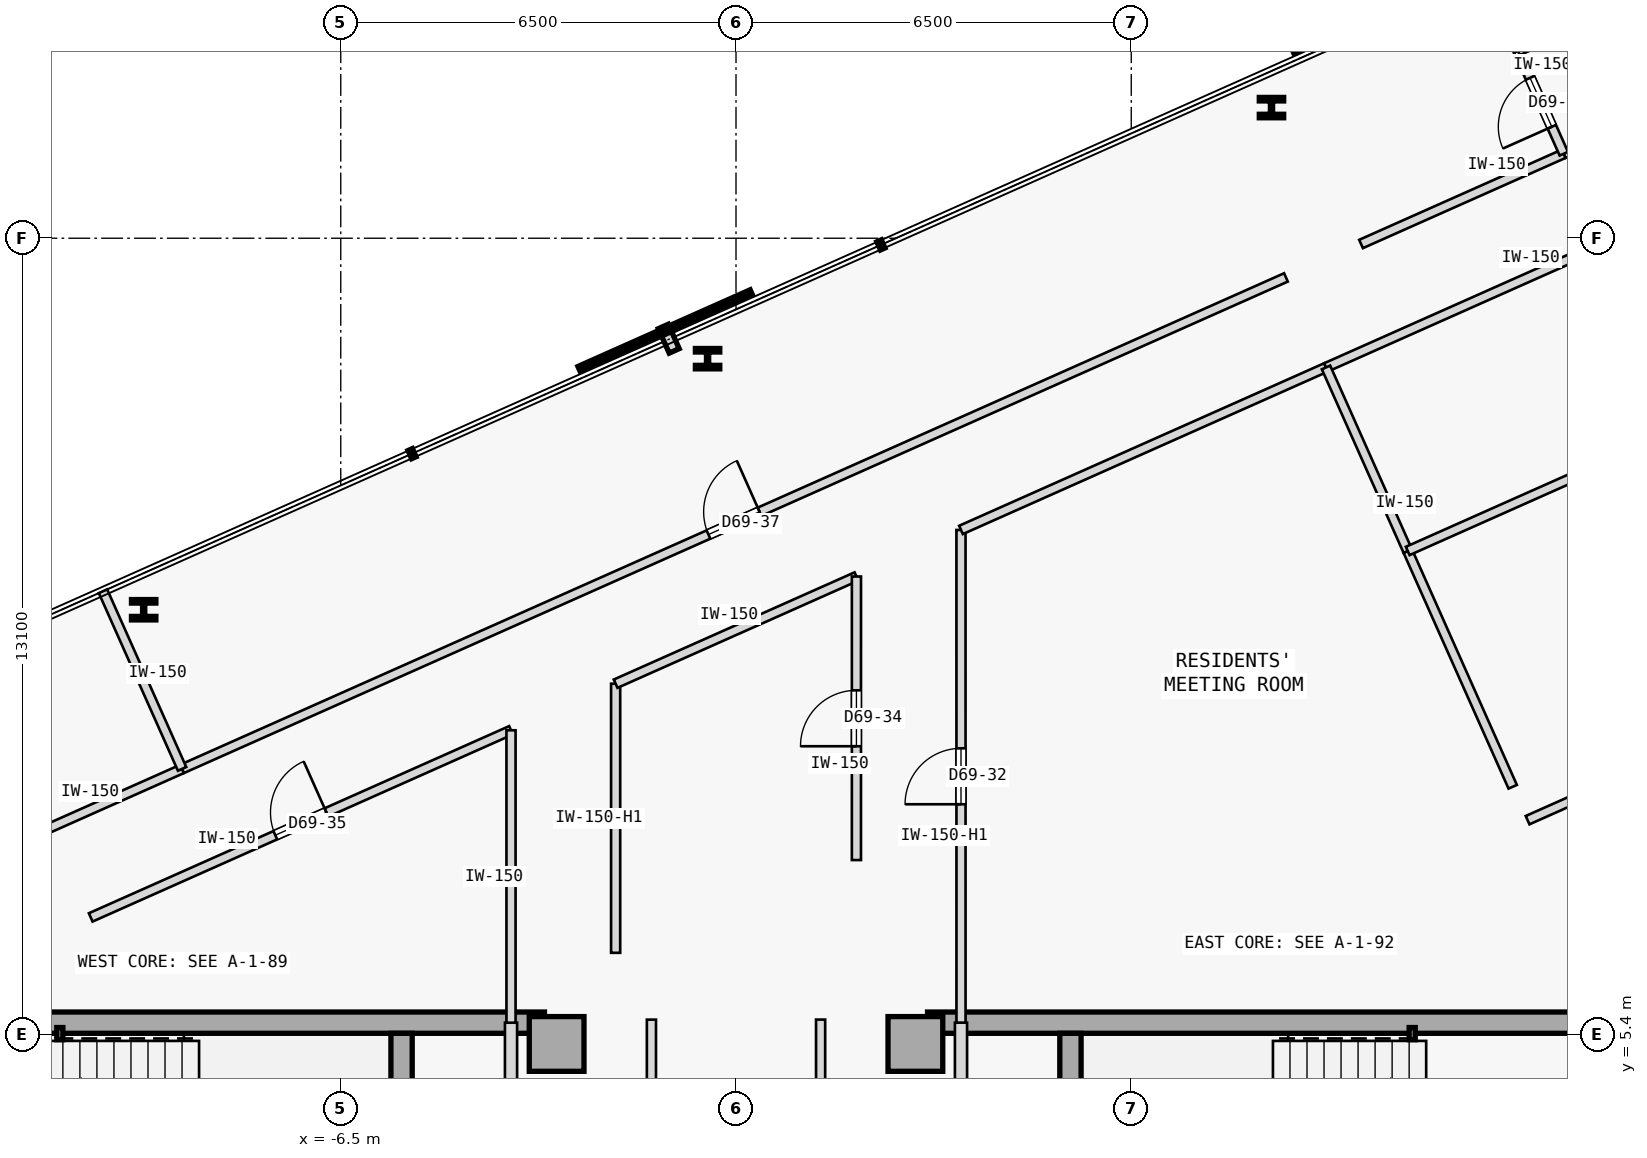
"""IFC4 building model, lengths in metres.
Left out: names, types, materials, properties, quantities, classifications, styles, units other than length and angle.
Written with IfcOpenShell. Run it as: python <this file> out.ifc"""

import sys

from ifc_helpers import new_model, si_unit, direction, frame, frame_2d, origin, origin_2d, place, context, subcontext, project, spatial, rectangle, hollow_rectangle, i_section, extrude, element, fill, save


model = new_model("IFC4")
c1 = context("Model", 3, precision=1e-05, world=origin(), true_north=direction((0.0, 1.0)))
c2 = subcontext(c1, "Body", "Model", "MODEL_VIEW")
j1 = project(units=[si_unit("LENGTHUNIT", "METRE"), si_unit("PLANEANGLEUNIT", "RADIAN")], contexts=[c1])
p1 = place(None, origin())
s1 = spatial("IfcSite", under=j1, at=p1, CompositionType="ELEMENT")
p2 = place(p1, origin())
s2 = spatial("IfcBuilding", under=s1, at=p2, CompositionType="ELEMENT")
p3 = place(p2, frame((0.0, 0.0, 258.85)))
s3 = spatial("IfcBuildingStorey", under=s2, at=p3, CompositionType="ELEMENT", Elevation=258.85)
for number, where, z_axis, x_axis in (
    (1, (-2.95, 5.25, 0.0), (0.0, 0.0, 1.0), (1.0, 0.0, 0.0)),
    (2, (2.95, 5.25, 0.0), (0.0, 0.0, 1.0), (1.0, 0.0, 0.0)),
):
    element("IfcColumn", number, at=place(p3, frame(where, z_axis=z_axis, x_axis=x_axis)), inside=s3, PredefinedType="COLUMN", context=c2, shape_type="SweptSolid", body=[
        extrude(rectangle(XDim=0.9, YDim=0.9, at=origin_2d()), origin(), (0.0, 0.0, 1.0), 3.35),
    ])
p4 = place(p3, frame((-14.56, 5.6, 0.0), z_axis=(0.0, 0.0, 1.0), x_axis=(1.0, 0.0, 0.0)))
e3 = element("IfcWall", 3, at=p4, inside=s3, PredefinedType="SHEAR", context=c2, shape_type="SweptSolid", body=[
    extrude(rectangle(XDim=11.41, YDim=0.35, at=frame_2d((5.705, 0.0))), origin(), (0.0, 0.0, 1.0), 3.125),
])
p5 = place(p3, frame((-5.5, 2.15, 0.0), z_axis=(0.0, 0.0, 1.0), x_axis=(0.0, 1.0, 0.0)))
e4 = element("IfcWall", 4, at=p5, inside=s3, PredefinedType="SHEAR", context=c2, shape_type="SweptSolid", body=[
    extrude(rectangle(XDim=3.275, YDim=0.35, at=frame_2d((1.638, 0.0))), origin(), (0.0, 0.0, 1.0), 3.125),
])
p6 = place(p3, frame((3.15, 5.6, 0.0), z_axis=(0.0, 0.0, 1.0), x_axis=(1.0, 0.0, 0.0)))
e5 = element("IfcWall", 5, at=p6, inside=s3, PredefinedType="SHEAR", context=c2, shape_type="SweptSolid", body=[
    extrude(rectangle(XDim=11.41, YDim=0.35, at=frame_2d((5.705, 0.0))), origin(), (0.0, 0.0, 1.0), 3.125),
])
p7 = place(p3, frame((5.5, 2.15, 0.0), z_axis=(0.0, 0.0, 1.0), x_axis=(0.0, 1.0, 0.0)))
e6 = element("IfcWall", 6, at=p7, inside=s3, PredefinedType="SHEAR", context=c2, shape_type="SweptSolid", body=[
    extrude(rectangle(XDim=3.275, YDim=0.35, at=frame_2d((1.638, 0.0))), origin(), (0.0, 0.0, 1.0), 3.125),
])
for number, where, z_axis, x_axis in (
    (7, (-11.12, 5.42, 0.0), (0.0, 0.0, 1.0), (1.0, 0.0, 0.0)),
    (8, (11.12, 5.42, 0.0), (0.0, 0.0, 1.0), (1.0, 0.0, 0.0)),
):
    element("IfcColumn", number, at=place(p3, frame(where, z_axis=z_axis, x_axis=x_axis)), inside=s3, PredefinedType="COLUMN", context=c2, shape_type="SweptSolid", body=[
        extrude(hollow_rectangle(XDim=0.1, YDim=0.2, WallThickness=0.008, at=origin_2d()), origin(), (0.0, 0.0, 1.0), 3.35),
    ])
for number, where, z_axis, x_axis in (
    (9, (8.806, 20.648, 0.0), (0.0, 0.0, 1.0), (1.0, 0.0, 0.0)),
    (10, (-0.468, 16.519, 0.0), (0.0, 0.0, 1.0), (1.0, 0.0, 0.0)),
    (11, (-9.741, 12.39, 0.0), (0.0, 0.0, 1.0), (1.0, 0.0, 0.0)),
):
    element("IfcColumn", number, at=place(p3, frame(where, z_axis=z_axis, x_axis=x_axis)), inside=s3, PredefinedType="COLUMN", context=c2, shape_type="SweptSolid", body=[
        extrude(i_section(OverallWidth=0.401, OverallDepth=0.335, WebThickness=0.036, FlangeThickness=0.058, FilletRadius=0.015, at=origin_2d()), origin(), (0.0, 0.0, 1.0), 3.35),
    ])
p8 = place(p3, frame((-3.7, -1.15, 0.0), z_axis=(0.0, 0.0, 1.0), x_axis=(0.0, 1.0, 0.0)))
e12 = element("IfcWall", 12, at=p8, inside=s3, PredefinedType="STANDARD", context=c2, shape_type="SweptSolid", body=[
    extrude(rectangle(XDim=6.75, YDim=0.2, at=frame_2d((3.375, 0.0))), origin(), (0.0, 0.0, 1.0), 3.125),
])
p9 = place(p8, frame((3.6, 0.0, 0.0)))
e13 = element("IfcOpeningElement", 13, at=p9, cuts=e12, PredefinedType="OPENING", context=c2, shape_type="SweptSolid", body=[
    extrude(rectangle(XDim=0.92, YDim=2.15, at=frame_2d((0.46, 1.075))), frame((0.0, 0.11, 0.0), z_axis=(0.0, -1.0, 0.0), x_axis=(1.0, 0.0, 0.0)), (0.0, 0.0, 1.0), 0.22),
])
p10 = place(p3, frame((3.7, -1.15, 0.0), z_axis=(0.0, 0.0, 1.0), x_axis=(0.0, 1.0, 0.0)))
e14 = element("IfcWall", 14, at=p10, inside=s3, PredefinedType="STANDARD", context=c2, shape_type="SweptSolid", body=[
    extrude(rectangle(XDim=6.75, YDim=0.2, at=frame_2d((3.375, 0.0))), origin(), (0.0, 0.0, 1.0), 3.125),
])
p11 = place(p10, frame((1.1, 0.0, 0.0)))
e15 = element("IfcOpeningElement", 15, at=p11, cuts=e14, PredefinedType="OPENING", context=c2, shape_type="SweptSolid", body=[
    extrude(rectangle(XDim=0.9, YDim=2.15, at=frame_2d((0.45, 1.075))), frame((0.0, 0.11, 0.0), z_axis=(0.0, -1.0, 0.0), x_axis=(1.0, 0.0, 0.0)), (0.0, 0.0, 1.0), 0.22),
])
p12 = place(p10, frame((4.0, 0.0, 0.0)))
e16 = element("IfcOpeningElement", 16, at=p12, cuts=e14, PredefinedType="OPENING", context=c2, shape_type="SweptSolid", body=[
    extrude(rectangle(XDim=0.92, YDim=2.15, at=frame_2d((0.46, 1.075))), frame((0.0, 0.11, 0.0), z_axis=(0.0, -1.0, 0.0), x_axis=(1.0, 0.0, 0.0)), (0.0, 0.0, 1.0), 0.22),
])
p13 = place(p3, frame((-1.391, -5.65, 0.0), z_axis=(0.0, 0.0, 1.0), x_axis=(-2.1605738e-05, 0.999999999767, 0.0)))
e17 = element("IfcWall", 17, at=p13, inside=s3, PredefinedType="PARTITIONING", context=c2, shape_type="SweptSolid", body=[
    extrude(rectangle(XDim=11.3, YDim=0.15, at=frame_2d((5.65, 0.0))), origin(), (0.0, 0.0, 1.0), 3.125),
])
p14 = place(p3, frame((1.391, -5.65, 0.0), z_axis=(0.0, 0.0, 1.0), x_axis=(4.3206809e-05, 0.999999999067, 0.0)))
e18 = element("IfcWall", 18, at=p14, inside=s3, PredefinedType="PARTITIONING", context=c2, shape_type="SweptSolid", body=[
    extrude(rectangle(XDim=11.301, YDim=0.15, at=frame_2d((5.65, 0.0))), origin(), (0.0, 0.0, 1.0), 3.125),
])
p15 = place(p14, frame((5.176, 0.0, 0.0)))
e19 = element("IfcOpeningElement", 19, at=p15, cuts=e18, PredefinedType="OPENING", context=c2, shape_type="SweptSolid", body=[
    extrude(rectangle(XDim=0.95, YDim=2.15, at=frame_2d((0.475, 1.075))), frame((0.0, 0.085, 0.0), z_axis=(0.0, -1.0, 0.0), x_axis=(1.0, 0.0, 0.0)), (0.0, 0.0, 1.0), 0.17),
])
p16 = place(p3, frame((10.279, 18.405, 0.0), z_axis=(0.0, 0.0, 1.0), x_axis=(0.913543802, 0.40674036169, 0.0)))
e20 = element("IfcWall", 20, at=p16, inside=s3, PredefinedType="PARTITIONING", context=c2, shape_type="SweptSolid", body=[
    extrude(rectangle(XDim=3.65, YDim=0.15, at=frame_2d((1.825, 0.0))), origin(), (0.0, 0.0, 1.0), 3.125),
])
p17 = place(p3, frame((13.613, 19.89, 0.0), z_axis=(0.0, 0.0, 1.0), x_axis=(0.913536363976, 0.406757067172, 0.0)))
e21 = element("IfcWall", 21, at=p17, inside=s3, PredefinedType="PARTITIONING", context=c2, shape_type="SweptSolid", body=[
    extrude(rectangle(XDim=2.27, YDim=0.15, at=frame_2d((1.135, 0.0))), origin(), (0.0, 0.0, 1.0), 3.125),
])
p18 = place(p3, frame((3.7, 5.601, 0.0), z_axis=(0.0, 0.0, 1.0), x_axis=(-6.0264561e-05, 0.999999998184, 0.0)))
e22 = element("IfcWall", 22, at=p18, inside=s3, PredefinedType="PARTITIONING", context=c2, shape_type="SweptSolid", body=[
    extrude(rectangle(XDim=8.102, YDim=0.15, at=frame_2d((4.051, 0.0))), origin(), (0.0, 0.0, 1.0), 2.675),
])
p19 = place(p18, frame((3.591, 0.0, 0.0)))
e23 = element("IfcOpeningElement", 23, at=p19, cuts=e22, PredefinedType="OPENING", context=c2, shape_type="SweptSolid", body=[
    extrude(rectangle(XDim=0.92, YDim=2.15, at=frame_2d((0.46, 1.075))), frame((0.0, 0.085, 0.0), z_axis=(0.0, -1.0, 0.0), x_axis=(1.0, 0.0, 0.0)), (0.0, 0.0, 1.0), 0.17),
])
p20 = place(p3, frame((3.7, 13.703, 0.0), z_axis=(0.0, 0.0, 1.0), x_axis=(0.913549363376, 0.406727870542, 0.0)))
e24 = element("IfcWall", 24, at=p20, inside=s3, PredefinedType="PARTITIONING", context=c2, shape_type="SweptSolid", body=[
    extrude(rectangle(XDim=6.571, YDim=0.15, at=frame_2d((3.286, 0.0))), origin(), (0.0, 0.0, 1.0), 3.125),
])
p21 = place(p3, frame((-1.98, 6.749, 0.0), z_axis=(0.0, 0.0, 1.0), x_axis=(0.0, 1.0, 0.0)))
e25 = element("IfcWall", 25, at=p21, inside=s3, PredefinedType="PARTITIONING", context=c2, shape_type="SweptSolid", body=[
    extrude(rectangle(XDim=4.426, YDim=0.15, at=frame_2d((2.213, 0.0))), origin(), (0.0, 0.0, 1.0), 2.675),
])
p22 = place(p3, frame((-1.98, 11.174, 0.0), z_axis=(0.0, 0.0, 1.0), x_axis=(0.913546598225, 0.406734081276, 0.0)))
e26 = element("IfcWall", 26, at=p22, inside=s3, PredefinedType="PARTITIONING", context=c2, shape_type="SweptSolid", body=[
    extrude(rectangle(XDim=4.335, YDim=0.15, at=frame_2d((2.167, 0.0))), origin(), (0.0, 0.0, 1.0), 3.125),
])
p23 = place(p3, frame((1.98, 8.274, 0.0), z_axis=(0.0, 0.0, 1.0), x_axis=(5.2356021e-05, 0.999999998629, 0.0)))
e27 = element("IfcWall", 27, at=p23, inside=s3, PredefinedType="PARTITIONING", context=c2, shape_type="SweptSolid", body=[
    extrude(rectangle(XDim=4.663, YDim=0.15, at=frame_2d((2.332, 0.0))), origin(), (0.0, 0.0, 1.0), 3.125),
])
p24 = place(p23, frame((1.872, 0.0, 0.0)))
e28 = element("IfcOpeningElement", 28, at=p24, cuts=e27, PredefinedType="OPENING", context=c2, shape_type="SweptSolid", body=[
    extrude(rectangle(XDim=0.92, YDim=2.15, at=frame_2d((0.46, 1.075))), frame((0.0, 0.085, 0.0), z_axis=(0.0, -1.0, 0.0), x_axis=(1.0, 0.0, 0.0)), (0.0, 0.0, 1.0), 0.17),
])
p25 = place(p3, frame((-10.612, 7.331, 0.0), z_axis=(0.0, 0.0, 1.0), x_axis=(0.913543890665, 0.406740162546, 0.0)))
e29 = element("IfcWall", 29, at=p25, inside=s3, PredefinedType="PARTITIONING", context=c2, shape_type="SweptSolid", body=[
    extrude(rectangle(XDim=7.566, YDim=0.15, at=frame_2d((3.783, 0.0))), origin(), (0.0, 0.0, 1.0), 3.125),
])
p26 = place(p25, frame((3.323, 0.0, 0.0)))
e30 = element("IfcOpeningElement", 30, at=p26, cuts=e29, PredefinedType="OPENING", context=c2, shape_type="SweptSolid", body=[
    extrude(rectangle(XDim=0.92, YDim=2.15, at=frame_2d((0.46, 1.075))), frame((0.0, 0.085, 0.0), z_axis=(0.0, -1.0, 0.0), x_axis=(1.0, 0.0, 0.0)), (0.0, 0.0, 1.0), 0.17),
])
p27 = place(p3, frame((-3.7, 5.6, 0.0), z_axis=(0.0, 0.0, 1.0), x_axis=(5.077173e-05, 0.999999998711, 0.0)))
e31 = element("IfcWall", 31, at=p27, inside=s3, PredefinedType="PARTITIONING", context=c2, shape_type="SweptSolid", body=[
    extrude(rectangle(XDim=4.809, YDim=0.15, at=frame_2d((2.404, 0.0))), origin(), (0.0, 0.0, 1.0), 3.125),
])
p28 = place(p3, frame((-19.32, 5.227, 0.0), z_axis=(0.0, 0.0, 1.0), x_axis=(0.913543828741, 0.406740301628, 0.0)))
e32 = element("IfcWall", 32, at=p28, inside=s3, PredefinedType="PARTITIONING", context=c2, shape_type="SweptSolid", body=[
    extrude(rectangle(XDim=11.177, YDim=0.15, at=frame_2d((5.588, 0.0))), origin(), (0.0, 0.0, 1.0), 3.125),
])
p29 = place(p28, frame((5.128, 0.0, 0.0)))
e33 = element("IfcOpeningElement", 33, at=p29, cuts=e32, PredefinedType="OPENING", context=c2, shape_type="SweptSolid", body=[
    extrude(rectangle(XDim=0.92, YDim=2.15, at=frame_2d((0.46, 1.075))), frame((0.0, 0.085, 0.0), z_axis=(0.0, -1.0, 0.0), x_axis=(1.0, 0.0, 0.0)), (0.0, 0.0, 1.0), 0.17),
])
p30 = place(p3, frame((-9.109, 9.773, 0.0), z_axis=(0.0, 0.0, 1.0), x_axis=(0.913545361298, 0.406736859469, 0.0)))
e34 = element("IfcWall", 34, at=p30, inside=s3, PredefinedType="PARTITIONING", context=c2, shape_type="SweptSolid", body=[
    extrude(rectangle(XDim=19.871, YDim=0.15, at=frame_2d((9.936, 0.0))), origin(), (0.0, 0.0, 1.0), 3.125),
])
p31 = place(p30, frame((9.476, 0.0, 0.0)))
e35 = element("IfcOpeningElement", 35, at=p31, cuts=e34, PredefinedType="OPENING", context=c2, shape_type="SweptSolid", body=[
    extrude(rectangle(XDim=0.92, YDim=2.15, at=frame_2d((0.46, 1.075))), frame((0.0, 0.085, 0.0), z_axis=(0.0, -1.0, 0.0), x_axis=(1.0, 0.0, 0.0)), (0.0, 0.0, 1.0), 0.17),
])
p32 = place(p3, frame((9.703, 16.375, 0.0), z_axis=(0.0, 0.0, 1.0), x_axis=(0.913544622417, 0.406738519018, 0.0)))
e36 = element("IfcWall", 36, at=p32, inside=s3, PredefinedType="PARTITIONING", context=c2, shape_type="SweptSolid", body=[
    extrude(rectangle(XDim=14.192, YDim=0.15, at=frame_2d((7.096, 0.0))), origin(), (0.0, 0.0, 1.0), 3.125),
])
p33 = place(p32, frame((6.636, 0.0, 0.0)))
e37 = element("IfcOpeningElement", 37, at=p33, cuts=e36, PredefinedType="OPENING", context=c2, shape_type="SweptSolid", body=[
    extrude(rectangle(XDim=0.92, YDim=2.15, at=frame_2d((0.46, 1.075))), frame((0.0, 0.085, 0.0), z_axis=(0.0, -1.0, 0.0), x_axis=(1.0, 0.0, 0.0)), (0.0, 0.0, 1.0), 0.17),
])
p34 = place(p3, frame((13.613, 19.89, 0.0), z_axis=(0.0, 0.0, 1.0), x_axis=(-0.406701600856, 0.913561058639, 0.0)))
e38 = element("IfcWall", 38, at=p34, inside=s3, PredefinedType="PARTITIONING", context=c2, shape_type="SweptSolid", body=[
    extrude(rectangle(XDim=1.85, YDim=0.15, at=frame_2d((0.925, 0.0))), origin(), (0.0, 0.0, 1.0), 3.125),
])
p35 = place(p34, frame((0.485, 0.0, 0.0)))
e39 = element("IfcOpeningElement", 39, at=p35, cuts=e38, PredefinedType="OPENING", context=c2, shape_type="SweptSolid", body=[
    extrude(rectangle(XDim=0.88, YDim=2.15, at=frame_2d((0.44, 1.075))), frame((0.0, 0.085, 0.0), z_axis=(0.0, -1.0, 0.0), x_axis=(1.0, 0.0, 0.0)), (0.0, 0.0, 1.0), 0.17),
])
p36 = place(p3, frame((12.861, 21.58, 0.0), z_axis=(0.0, 0.0, 1.0), x_axis=(0.913536363976, 0.406757067172, 0.0)))
e40 = element("IfcWall", 40, at=p36, inside=s3, PredefinedType="PARTITIONING", context=c2, shape_type="SweptSolid", body=[
    extrude(rectangle(XDim=2.27, YDim=0.15, at=frame_2d((1.135, 0.0))), origin(), (0.0, 0.0, 1.0), 3.125),
])
p37 = place(p3, frame((12.773, 9.479, 0.0), z_axis=(0.0, 0.0, 1.0), x_axis=(-0.406762672331, 0.913533868227, 0.0)))
e41 = element("IfcWall", 41, at=p37, inside=s3, PredefinedType="PARTITIONING", context=c2, shape_type="SweptSolid", body=[
    extrude(rectangle(XDim=4.245, YDim=0.15, at=frame_2d((2.123, 0.0))), origin(), (0.0, 0.0, 1.0), 3.125),
])
p38 = place(p3, frame((11.046, 13.357, 0.0), z_axis=(0.0, 0.0, 1.0), x_axis=(-0.406714303965, 0.913555403328, 0.0)))
e42 = element("IfcWall", 42, at=p38, inside=s3, PredefinedType="PARTITIONING", context=c2, shape_type="SweptSolid", body=[
    extrude(rectangle(XDim=3.304, YDim=0.15, at=frame_2d((1.652, 0.0))), origin(), (0.0, 0.0, 1.0), 3.125),
])
p39 = place(p3, frame((-9.109, 9.773, 0.0), z_axis=(0.0, 0.0, 1.0), x_axis=(-0.406698002142, 0.913562660716, 0.0)))
e43 = element("IfcWall", 43, at=p39, inside=s3, PredefinedType="PARTITIONING", context=c2, shape_type="SweptSolid", body=[
    extrude(rectangle(XDim=3.198, YDim=0.15, at=frame_2d((1.599, 0.0))), origin(), (0.0, 0.0, 1.0), 3.125),
])
p40 = place(p3, frame((13.018, 8.93, 0.0), z_axis=(0.0, 0.0, 1.0), x_axis=(0.913551014388, 0.406724162191, 0.0)))
e44 = element("IfcWall", 44, at=p40, inside=s3, PredefinedType="PARTITIONING", context=c2, shape_type="SweptSolid", body=[
    extrude(rectangle(XDim=14.192, YDim=0.15, at=frame_2d((7.096, 0.0))), origin(), (0.0, 0.0, 1.0), 3.125),
])
p41 = place(p40, frame((6.636, 0.0, 0.0)))
e45 = element("IfcOpeningElement", 45, at=p41, cuts=e44, PredefinedType="OPENING", context=c2, shape_type="SweptSolid", body=[
    extrude(rectangle(XDim=0.92, YDim=2.15, at=frame_2d((0.46, 1.075))), frame((0.0, 0.085, 0.0), z_axis=(0.0, -1.0, 0.0), x_axis=(1.0, 0.0, 0.0)), (0.0, 0.0, 1.0), 0.17),
])
p42 = place(p3, frame((11.046, 13.357, 0.0), z_axis=(0.0, 0.0, 1.0), x_axis=(0.913553860075, 0.406717770379, 0.0)))
e46 = element("IfcWall", 46, at=p42, inside=s3, PredefinedType="PARTITIONING", context=c2, shape_type="SweptSolid", body=[
    extrude(rectangle(XDim=14.192, YDim=0.15, at=frame_2d((7.096, 0.0))), origin(), (0.0, 0.0, 1.0), 3.125),
])
p43 = place(p35, origin())
e47 = element("IfcDoor", 47, at=p43, inside=s3, OperationType="SINGLE_SWING_LEFT", PredefinedType="DOOR", context=c2, shape_type="SweptSolid", body=[
    extrude(rectangle(XDim=0.88, YDim=2.15, at=frame_2d((0.44, 1.075))), frame((0.0, 0.025, 0.0), z_axis=(0.0, -1.0, 0.0), x_axis=(1.0, 0.0, 0.0)), (0.0, 0.0, 1.0), 0.05),
])
fill(e39, e47)
p44 = place(p19, origin())
e48 = element("IfcDoor", 48, at=p44, inside=s3, OperationType="SINGLE_SWING_LEFT", PredefinedType="DOOR", context=c2, shape_type="SweptSolid", body=[
    extrude(rectangle(XDim=0.92, YDim=2.15, at=frame_2d((0.46, 1.075))), frame((0.0, 0.025, 0.0), z_axis=(0.0, -1.0, 0.0), x_axis=(1.0, 0.0, 0.0)), (0.0, 0.0, 1.0), 0.05),
])
fill(e23, e48)
p45 = place(p24, origin())
e49 = element("IfcDoor", 49, at=p45, inside=s3, OperationType="SINGLE_SWING_LEFT", PredefinedType="DOOR", context=c2, shape_type="SweptSolid", body=[
    extrude(rectangle(XDim=0.92, YDim=2.15, at=frame_2d((0.46, 1.075))), frame((0.0, 0.025, 0.0), z_axis=(0.0, -1.0, 0.0), x_axis=(1.0, 0.0, 0.0)), (0.0, 0.0, 1.0), 0.05),
])
fill(e28, e49)
p46 = place(p26, origin())
e50 = element("IfcDoor", 50, at=p46, inside=s3, OperationType="SINGLE_SWING_RIGHT", PredefinedType="DOOR", context=c2, shape_type="SweptSolid", body=[
    extrude(rectangle(XDim=0.92, YDim=2.15, at=frame_2d((0.46, 1.075))), frame((0.0, 0.025, 0.0), z_axis=(0.0, -1.0, 0.0), x_axis=(1.0, 0.0, 0.0)), (0.0, 0.0, 1.0), 0.05),
])
fill(e30, e50)
p47 = place(p31, origin())
e51 = element("IfcDoor", 51, at=p47, inside=s3, OperationType="SINGLE_SWING_RIGHT", PredefinedType="DOOR", context=c2, shape_type="SweptSolid", body=[
    extrude(rectangle(XDim=0.92, YDim=2.15, at=frame_2d((0.46, 1.075))), frame((0.0, 0.025, 0.0), z_axis=(0.0, -1.0, 0.0), x_axis=(1.0, 0.0, 0.0)), (0.0, 0.0, 1.0), 0.05),
])
fill(e35, e51)
save(model, sys.argv[1])
